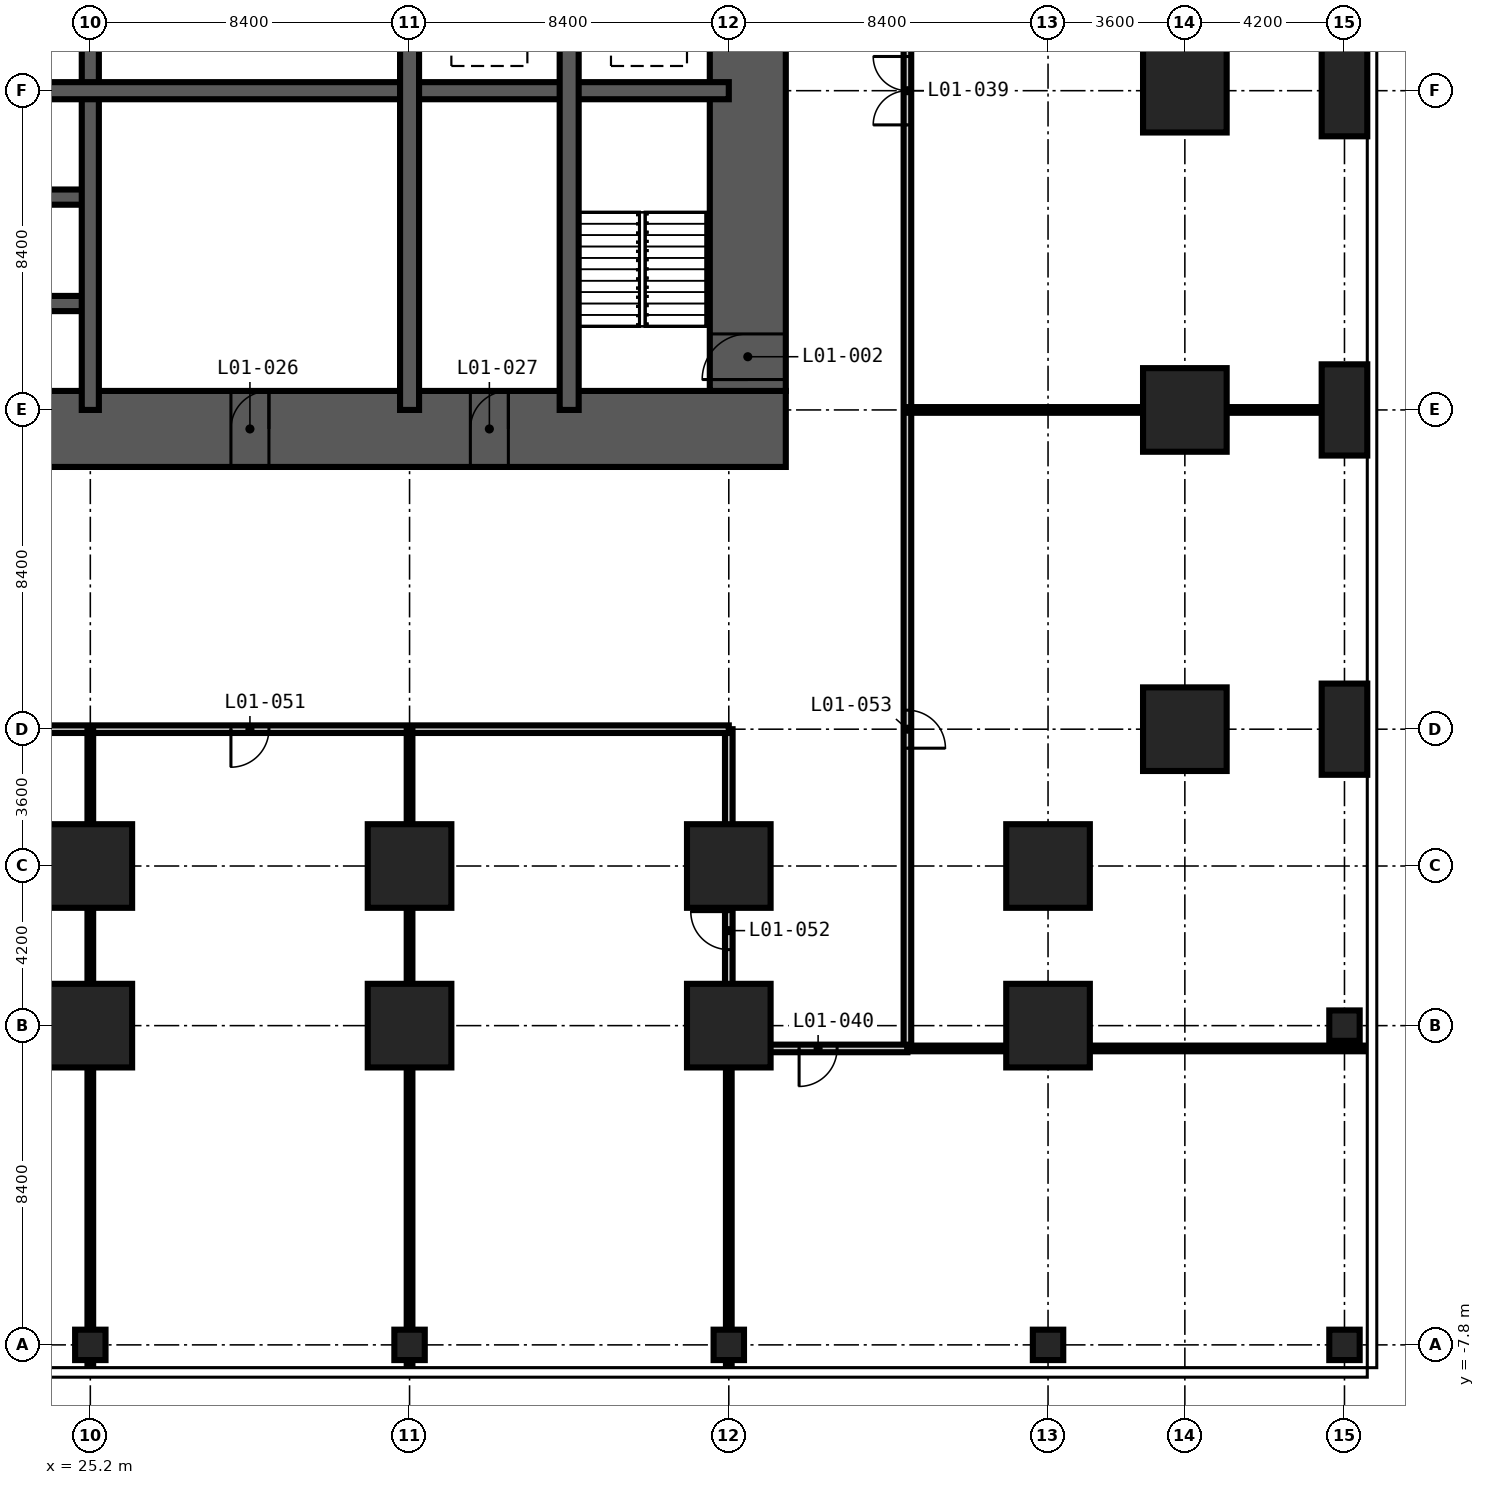
"""IFC4 building model, lengths in metres.
Left out: names, types, materials, properties, quantities, classifications, styles, units other than length and angle.
Written with IfcOpenShell. Run it as: python <this file> out.ifc"""

import sys

from ifc_helpers import new_model, si_unit, direction, frame, frame_2d, origin, origin_2d, place, context, subcontext, project, spatial, rectangle, extrude, element, fill, save


model = new_model("IFC4")
c1 = context("Model", 3, precision=1e-05, world=origin(), true_north=direction((0.0, 1.0)))
c2 = subcontext(c1, "Body", "Model", "MODEL_VIEW")
j1 = project(units=[si_unit("LENGTHUNIT", "METRE"), si_unit("PLANEANGLEUNIT", "RADIAN")], contexts=[c1])
p1 = place(None, origin())
s1 = spatial("IfcSite", under=j1, at=p1, CompositionType="ELEMENT")
p2 = place(p1, origin())
s2 = spatial("IfcBuilding", under=s1, at=p2, CompositionType="ELEMENT")
p3 = place(p2, frame((0.0, 0.0, 6.0)))
s3 = spatial("IfcBuildingStorey", under=s2, at=p3, CompositionType="ELEMENT", Elevation=6.0)
for number, where, z_axis, x_axis in (
    (1, (25.2, 0.6, -0.3), (0.0, 0.0, 1.0), (1.0, 0.0, 0.0)),
    (2, (25.2, 4.8, -0.3), (0.0, 0.0, 1.0), (1.0, 0.0, 0.0)),
    (3, (33.6, 0.6, -0.3), (0.0, 0.0, 1.0), (1.0, 0.0, 0.0)),
    (4, (33.6, 4.8, -0.3), (0.0, 0.0, 1.0), (1.0, 0.0, 0.0)),
    (5, (42.0, 0.6, -0.3), (0.0, 0.0, 1.0), (1.0, 0.0, 0.0)),
    (6, (42.0, 4.8, -0.3), (0.0, 0.0, 1.0), (1.0, 0.0, 0.0)),
    (7, (50.4, 0.6, -0.3), (0.0, 0.0, 1.0), (1.0, 0.0, 0.0)),
    (8, (50.4, 4.8, -0.3), (0.0, 0.0, 1.0), (1.0, 0.0, 0.0)),
    (9, (54.0, 8.4, -0.3), (0.0, 0.0, 1.0), (1.0, 0.0, 0.0)),
    (10, (54.0, 16.8, -0.3), (0.0, 0.0, 1.0), (1.0, 0.0, 0.0)),
    (11, (54.0, 25.2, -0.3), (0.0, 0.0, 1.0), (1.0, 0.0, 0.0)),
):
    element("IfcColumn", number, at=place(p3, frame(where, z_axis=z_axis, x_axis=x_axis)), inside=s3, PredefinedType="COLUMN", context=c2, shape_type="SweptSolid", body=[
        extrude(rectangle(XDim=2.2, YDim=2.2, at=origin_2d()), origin(), (0.0, 0.0, 1.0), 6.0),
    ])
for number, where, z_axis, x_axis in (
    (12, (58.2, 8.4, -0.3), (0.0, 0.0, 1.0), (1.0, 0.0, 0.0)),
    (13, (58.2, 16.8, -0.3), (0.0, 0.0, 1.0), (1.0, 0.0, 0.0)),
    (14, (58.2, 25.2, -0.3), (0.0, 0.0, 1.0), (1.0, 0.0, 0.0)),
):
    element("IfcColumn", number, at=place(p3, frame(where, z_axis=z_axis, x_axis=x_axis)), inside=s3, PredefinedType="COLUMN", context=c2, shape_type="SweptSolid", body=[
        extrude(rectangle(XDim=1.2, YDim=2.4, at=origin_2d()), origin(), (0.0, 0.0, 1.0), 6.0),
    ])
for number, where, z_axis, x_axis in (
    (15, (25.2, -7.8, -0.3), (0.0, 0.0, 1.0), (1.0, 0.0, 0.0)),
    (16, (33.6, -7.8, -0.3), (0.0, 0.0, 1.0), (1.0, 0.0, 0.0)),
    (17, (42.0, -7.8, -0.3), (0.0, 0.0, 1.0), (1.0, 0.0, 0.0)),
    (18, (50.4, -7.8, -0.3), (0.0, 0.0, 1.0), (1.0, 0.0, 0.0)),
    (19, (58.2, -7.8, -0.3), (0.0, 0.0, 1.0), (1.0, 0.0, 0.0)),
    (20, (58.2, 0.6, -0.3), (0.0, 0.0, 1.0), (1.0, 0.0, 0.0)),
):
    element("IfcColumn", number, at=place(p3, frame(where, z_axis=z_axis, x_axis=x_axis)), inside=s3, PredefinedType="COLUMN", context=c2, shape_type="SweptSolid", body=[
        extrude(rectangle(XDim=0.8, YDim=0.8, at=origin_2d()), origin(), (0.0, 0.0, 1.0), 6.0),
    ])
p4 = place(p3, frame((15.3, 16.3, -0.3), z_axis=(0.0, 0.0, 1.0), x_axis=(1.0, 0.0, 0.0)))
e21 = element("IfcWall", 21, at=p4, inside=s3, PredefinedType="SHEAR", context=c2, shape_type="SweptSolid", body=[
    extrude(rectangle(XDim=28.2, YDim=2.0, at=frame_2d((14.1, 0.0))), origin(), (0.0, 0.0, 1.0), 6.0),
])
p5 = place(p4, frame((13.6, 0.0, 0.3)))
e22 = element("IfcOpeningElement", 22, at=p5, cuts=e21, PredefinedType="OPENING", context=c2, shape_type="SweptSolid", body=[
    extrude(rectangle(XDim=1.0, YDim=2.1, at=frame_2d((0.5, 1.05))), frame((0.0, 1.01, 0.0), z_axis=(0.0, -1.0, 0.0), x_axis=(1.0, 0.0, 0.0)), (0.0, 0.0, 1.0), 2.02),
])
p6 = place(p4, frame((19.9, 0.0, 0.3)))
e23 = element("IfcOpeningElement", 23, at=p6, cuts=e21, PredefinedType="OPENING", context=c2, shape_type="SweptSolid", body=[
    extrude(rectangle(XDim=1.0, YDim=2.1, at=frame_2d((0.5, 1.05))), frame((0.0, 1.01, 0.0), z_axis=(0.0, -1.0, 0.0), x_axis=(1.0, 0.0, 0.0)), (0.0, 0.0, 1.0), 2.02),
])
p7 = place(p3, frame((42.5, 17.3, -0.3), z_axis=(0.0, 0.0, 1.0), x_axis=(0.0, 1.0, 0.0)))
e24 = element("IfcWall", 24, at=p7, inside=s3, PredefinedType="SHEAR", context=c2, shape_type="SweptSolid", body=[
    extrude(rectangle(XDim=24.2, YDim=2.0, at=frame_2d((12.1, 0.0))), origin(), (0.0, 0.0, 1.0), 6.0),
])
p8 = place(p7, frame((0.3, 0.0, 0.3)))
e25 = element("IfcOpeningElement", 25, at=p8, cuts=e24, PredefinedType="OPENING", context=c2, shape_type="SweptSolid", body=[
    extrude(rectangle(XDim=1.2, YDim=2.2, at=frame_2d((0.6, 1.1))), frame((0.0, 1.01, 0.0), z_axis=(0.0, -1.0, 0.0), x_axis=(1.0, 0.0, 0.0)), (0.0, 0.0, 1.0), 2.02),
])
p9 = place(p7, frame((11.6, 0.0, 0.3)))
e26 = element("IfcOpeningElement", 26, at=p9, cuts=e24, PredefinedType="OPENING", context=c2, shape_type="SweptSolid", body=[
    extrude(rectangle(XDim=1.0, YDim=2.1, at=frame_2d((0.5, 1.05))), frame((0.0, 1.01, 0.0), z_axis=(0.0, -1.0, 0.0), x_axis=(1.0, 0.0, 0.0)), (0.0, 0.0, 1.0), 2.02),
])
p10 = place(p7, frame((20.0, 0.0, 0.3)))
e27 = element("IfcOpeningElement", 27, at=p10, cuts=e24, PredefinedType="OPENING", context=c2, shape_type="SweptSolid", body=[
    extrude(rectangle(XDim=1.0, YDim=2.1, at=frame_2d((0.5, 1.05))), frame((0.0, 1.01, 0.0), z_axis=(0.0, -1.0, 0.0), x_axis=(1.0, 0.0, 0.0)), (0.0, 0.0, 1.0), 2.02),
])
for number, where, z_axis, x_axis in (
    (28, (16.8, 19.6, -0.3), (0.0, 0.0, 1.0), (1.0, 0.0, 0.0)),
    (29, (16.8, 22.4, -0.3), (0.0, 0.0, 1.0), (1.0, 0.0, 0.0)),
):
    element("IfcWall", number, at=place(p3, frame(where, z_axis=z_axis, x_axis=x_axis)), inside=s3, PredefinedType="SHEAR", context=c2, shape_type="SweptSolid", body=[
        extrude(rectangle(XDim=8.4, YDim=0.4, at=frame_2d((4.2, 0.0))), origin(), (0.0, 0.0, 1.0), 6.0),
    ])
for number, where, z_axis, x_axis in (
    (30, (25.2, 16.8, -0.3), (0.0, 0.0, 1.0), (0.0, 1.0, 0.0)),
    (31, (16.8, 25.2, -0.3), (0.0, 0.0, 1.0), (1.0, 0.0, 0.0)),
):
    element("IfcWall", number, at=place(p3, frame(where, z_axis=z_axis, x_axis=x_axis)), inside=s3, PredefinedType="SHEAR", context=c2, shape_type="SweptSolid", body=[
        extrude(rectangle(XDim=25.2, YDim=0.45, at=frame_2d((12.6, 0.0))), origin(), (0.0, 0.0, 1.0), 6.0),
    ])
p11 = place(p3, frame((33.6, 16.8, -0.3), z_axis=(0.0, 0.0, 1.0), x_axis=(0.0, 1.0, 0.0)))
e32 = element("IfcWall", 32, at=p11, inside=s3, PredefinedType="SHEAR", context=c2, shape_type="SweptSolid", body=[
    extrude(rectangle(XDim=25.2, YDim=0.5, at=frame_2d((12.6, 0.0))), origin(), (0.0, 0.0, 1.0), 6.0),
])
p12 = place(p11, frame((22.5, 0.0, 0.3)))
e33 = element("IfcOpeningElement", 33, at=p12, cuts=e32, PredefinedType="OPENING", context=c2, shape_type="SweptSolid", body=[
    extrude(rectangle(XDim=1.2, YDim=2.2, at=frame_2d((0.6, 1.1))), frame((0.0, 0.26, 0.0), z_axis=(0.0, -1.0, 0.0), x_axis=(1.0, 0.0, 0.0)), (0.0, 0.0, 1.0), 0.52),
])
p13 = place(p11, frame((18.3, 0.0, 0.3)))
e34 = element("IfcOpeningElement", 34, at=p13, cuts=e32, PredefinedType="OPENING", context=c2, shape_type="SweptSolid", body=[
    extrude(rectangle(XDim=1.2, YDim=2.2, at=frame_2d((0.6, 1.1))), frame((0.0, 0.26, 0.0), z_axis=(0.0, -1.0, 0.0), x_axis=(1.0, 0.0, 0.0)), (0.0, 0.0, 1.0), 0.52),
])
p14 = place(p11, frame((12.1, 0.0, 0.3)))
e35 = element("IfcOpeningElement", 35, at=p14, cuts=e32, PredefinedType="OPENING", context=c2, shape_type="SweptSolid", body=[
    extrude(rectangle(XDim=1.0, YDim=2.1, at=frame_2d((0.5, 1.05))), frame((0.0, 0.26, 0.0), z_axis=(0.0, -1.0, 0.0), x_axis=(1.0, 0.0, 0.0)), (0.0, 0.0, 1.0), 0.52),
])
p15 = place(p3, frame((37.8, 16.8, -0.3), z_axis=(0.0, 0.0, 1.0), x_axis=(0.0, 1.0, 0.0)))
e36 = element("IfcWall", 36, at=p15, inside=s3, PredefinedType="SHEAR", context=c2, shape_type="SweptSolid", body=[
    extrude(rectangle(XDim=11.2, YDim=0.5, at=frame_2d((5.6, 0.0))), origin(), (0.0, 0.0, 1.0), 6.0),
])
p16 = place(p3, frame((42.0, 0.0, 0.0), z_axis=(0.0, 0.0, 1.0), x_axis=(0.0, 1.0, 0.0)))
e37 = element("IfcWall", 37, at=p16, inside=s3, PredefinedType="PARTITIONING", context=c2, shape_type="SweptSolid", body=[
    extrude(rectangle(XDim=8.4, YDim=0.2, at=frame_2d((4.2, 0.0))), origin(), (0.0, 0.0, 1.0), 5.7),
])
p17 = place(p16, frame((2.6, 0.0, 0.0)))
e38 = element("IfcOpeningElement", 38, at=p17, cuts=e37, PredefinedType="OPENING", context=c2, shape_type="SweptSolid", body=[
    extrude(rectangle(XDim=1.0, YDim=2.1, at=frame_2d((0.5, 1.05))), frame((0.0, 0.11, 0.0), z_axis=(0.0, -1.0, 0.0), x_axis=(1.0, 0.0, 0.0)), (0.0, 0.0, 1.0), 0.22),
])
p18 = place(p3, frame((46.7, 0.0, 0.0), z_axis=(0.0, 0.0, 1.0), x_axis=(0.0, 1.0, 0.0)))
e39 = element("IfcWall", 39, at=p18, inside=s3, PredefinedType="PARTITIONING", context=c2, shape_type="SweptSolid", body=[
    extrude(rectangle(XDim=42.0, YDim=0.2, at=frame_2d((21.0, 0.0))), origin(), (0.0, 0.0, 1.0), 5.7),
])
p19 = place(p18, frame((24.3, 0.0, 0.0)))
e40 = element("IfcOpeningElement", 40, at=p19, cuts=e39, PredefinedType="OPENING", context=c2, shape_type="SweptSolid", body=[
    extrude(rectangle(XDim=1.8, YDim=2.4, at=frame_2d((0.9, 1.2))), frame((0.0, 0.11, 0.0), z_axis=(0.0, -1.0, 0.0), x_axis=(1.0, 0.0, 0.0)), (0.0, 0.0, 1.0), 0.22),
])
p20 = place(p18, frame((7.9, 0.0, 0.0)))
e41 = element("IfcOpeningElement", 41, at=p20, cuts=e39, PredefinedType="OPENING", context=c2, shape_type="SweptSolid", body=[
    extrude(rectangle(XDim=1.0, YDim=2.1, at=frame_2d((0.5, 1.05))), frame((0.0, 0.11, 0.0), z_axis=(0.0, -1.0, 0.0), x_axis=(1.0, 0.0, 0.0)), (0.0, 0.0, 1.0), 0.22),
])
p21 = place(p18, frame((37.3, 0.0, 0.0)))
e42 = element("IfcOpeningElement", 42, at=p21, cuts=e39, PredefinedType="OPENING", context=c2, shape_type="SweptSolid", body=[
    extrude(rectangle(XDim=1.0, YDim=2.1, at=frame_2d((0.5, 1.05))), frame((0.0, 0.11, 0.0), z_axis=(0.0, -1.0, 0.0), x_axis=(1.0, 0.0, 0.0)), (0.0, 0.0, 1.0), 0.22),
])
p22 = place(p3, frame((42.0, 0.0, 0.0), z_axis=(0.0, 0.0, 1.0), x_axis=(1.0, 0.0, 0.0)))
e43 = element("IfcWall", 43, at=p22, inside=s3, PredefinedType="PARTITIONING", context=c2, shape_type="SweptSolid", body=[
    extrude(rectangle(XDim=4.7, YDim=0.2, at=frame_2d((2.35, 0.0))), origin(), (0.0, 0.0, 1.0), 5.7),
])
p23 = place(p22, frame((1.85, 0.0, 0.0)))
e44 = element("IfcOpeningElement", 44, at=p23, cuts=e43, PredefinedType="OPENING", context=c2, shape_type="SweptSolid", body=[
    extrude(rectangle(XDim=1.0, YDim=2.1, at=frame_2d((0.5, 1.05))), frame((0.0, 0.11, 0.0), z_axis=(0.0, -1.0, 0.0), x_axis=(1.0, 0.0, 0.0)), (0.0, 0.0, 1.0), 0.22),
])
p24 = place(p3, frame((0.0, 8.4, 0.0), z_axis=(0.0, 0.0, 1.0), x_axis=(1.0, 0.0, 0.0)))
e45 = element("IfcWall", 45, at=p24, inside=s3, PredefinedType="PARTITIONING", context=c2, shape_type="SweptSolid", body=[
    extrude(rectangle(XDim=42.0, YDim=0.2, at=frame_2d((21.0, 0.0))), origin(), (0.0, 0.0, 1.0), 5.7),
])
p25 = place(p24, frame((6.0, 0.0, 0.0)))
e46 = element("IfcOpeningElement", 46, at=p25, cuts=e45, PredefinedType="OPENING", context=c2, shape_type="SweptSolid", body=[
    extrude(rectangle(XDim=1.0, YDim=2.1, at=frame_2d((0.5, 1.05))), frame((0.0, 0.11, 0.0), z_axis=(0.0, -1.0, 0.0), x_axis=(1.0, 0.0, 0.0)), (0.0, 0.0, 1.0), 0.22),
])
p26 = place(p24, frame((18.0, 0.0, 0.0)))
e47 = element("IfcOpeningElement", 47, at=p26, cuts=e45, PredefinedType="OPENING", context=c2, shape_type="SweptSolid", body=[
    extrude(rectangle(XDim=1.8, YDim=2.4, at=frame_2d((0.9, 1.2))), frame((0.0, 0.11, 0.0), z_axis=(0.0, -1.0, 0.0), x_axis=(1.0, 0.0, 0.0)), (0.0, 0.0, 1.0), 0.22),
])
p27 = place(p24, frame((28.9, 0.0, 0.0)))
e48 = element("IfcOpeningElement", 48, at=p27, cuts=e45, PredefinedType="OPENING", context=c2, shape_type="SweptSolid", body=[
    extrude(rectangle(XDim=1.0, YDim=2.1, at=frame_2d((0.5, 1.05))), frame((0.0, 0.11, 0.0), z_axis=(0.0, -1.0, 0.0), x_axis=(1.0, 0.0, 0.0)), (0.0, 0.0, 1.0), 0.22),
])
for number, where, z_axis, x_axis in (
    (49, (25.2, -8.4, 0.0), (0.0, 0.0, 1.0), (0.0, 1.0, 0.0)),
    (50, (33.6, -8.4, 0.0), (0.0, 0.0, 1.0), (0.0, 1.0, 0.0)),
):
    element("IfcWall", number, at=place(p3, frame(where, z_axis=z_axis, x_axis=x_axis)), inside=s3, PredefinedType="PARTITIONING", context=c2, shape_type="SweptSolid", body=[
        extrude(rectangle(XDim=16.8, YDim=0.15, at=frame_2d((8.4, 0.0))), origin(), (0.0, 0.0, 1.0), 5.7),
    ])
p28 = place(p3, frame((42.0, -8.4, 0.0), z_axis=(0.0, 0.0, 1.0), x_axis=(0.0, 1.0, 0.0)))
e51 = element("IfcWall", 51, at=p28, inside=s3, PredefinedType="PARTITIONING", context=c2, shape_type="SweptSolid", body=[
    extrude(rectangle(XDim=8.4, YDim=0.15, at=frame_2d((4.2, 0.0))), origin(), (0.0, 0.0, 1.0), 5.7),
])
for number, where, z_axis, x_axis in (
    (52, (46.7, 0.0, 0.0), (0.0, 0.0, 1.0), (1.0, 0.0, 0.0)),
    (53, (46.7, 16.8, 0.0), (0.0, 0.0, 1.0), (1.0, 0.0, 0.0)),
):
    element("IfcWall", number, at=place(p3, frame(where, z_axis=z_axis, x_axis=x_axis)), inside=s3, PredefinedType="PARTITIONING", context=c2, shape_type="SweptSolid", body=[
        extrude(rectangle(XDim=12.1, YDim=0.15, at=frame_2d((6.05, 0.0))), origin(), (0.0, 0.0, 1.0), 5.7),
    ])
p29 = place(p8, origin())
e54 = element("IfcDoor", 54, at=p29, inside=s3, OperationType="SINGLE_SWING_LEFT", PredefinedType="DOOR", context=c2, shape_type="SweptSolid", body=[
    extrude(rectangle(XDim=1.2, YDim=2.2, at=frame_2d((0.6, 1.1))), frame((0.0, 0.025, 0.0), z_axis=(0.0, -1.0, 0.0), x_axis=(1.0, 0.0, 0.0)), (0.0, 0.0, 1.0), 0.05),
])
fill(e25, e54)
p30 = place(p5, origin())
e55 = element("IfcDoor", 55, at=p30, inside=s3, OperationType="SINGLE_SWING_RIGHT", PredefinedType="DOOR", context=c2, shape_type="SweptSolid", body=[
    extrude(rectangle(XDim=1.0, YDim=2.1, at=frame_2d((0.5, 1.05))), frame((0.0, 0.025, 0.0), z_axis=(0.0, -1.0, 0.0), x_axis=(1.0, 0.0, 0.0)), (0.0, 0.0, 1.0), 0.05),
])
fill(e22, e55)
p31 = place(p6, origin())
e56 = element("IfcDoor", 56, at=p31, inside=s3, OperationType="SINGLE_SWING_RIGHT", PredefinedType="DOOR", context=c2, shape_type="SweptSolid", body=[
    extrude(rectangle(XDim=1.0, YDim=2.1, at=frame_2d((0.5, 1.05))), frame((0.0, 0.025, 0.0), z_axis=(0.0, -1.0, 0.0), x_axis=(1.0, 0.0, 0.0)), (0.0, 0.0, 1.0), 0.05),
])
fill(e23, e56)
p32 = place(p19, origin())
e57 = element("IfcDoor", 57, at=p32, inside=s3, OperationType="DOUBLE_DOOR_DOUBLE_SWING", PredefinedType="DOOR", context=c2, shape_type="SweptSolid", body=[
    extrude(rectangle(XDim=1.8, YDim=2.4, at=frame_2d((0.9, 1.2))), frame((0.0, 0.025, 0.0), z_axis=(0.0, -1.0, 0.0), x_axis=(1.0, 0.0, 0.0)), (0.0, 0.0, 1.0), 0.05),
])
fill(e40, e57)
p33 = place(p23, frame((1.0, 0.0, 0.0), z_axis=(0.0, 0.0, 1.0), x_axis=(-1.0, 0.0, 0.0)))
e58 = element("IfcDoor", 58, at=p33, inside=s3, OperationType="SINGLE_SWING_RIGHT", PredefinedType="DOOR", context=c2, shape_type="SweptSolid", body=[
    extrude(rectangle(XDim=1.0, YDim=2.1, at=frame_2d((0.5, 1.05))), frame((0.0, 0.025, 0.0), z_axis=(0.0, -1.0, 0.0), x_axis=(1.0, 0.0, 0.0)), (0.0, 0.0, 1.0), 0.05),
])
fill(e44, e58)
p34 = place(p27, frame((1.0, 0.0, 0.0), z_axis=(0.0, 0.0, 1.0), x_axis=(-1.0, 0.0, 0.0)))
e59 = element("IfcDoor", 59, at=p34, inside=s3, OperationType="SINGLE_SWING_RIGHT", PredefinedType="DOOR", context=c2, shape_type="SweptSolid", body=[
    extrude(rectangle(XDim=1.0, YDim=2.1, at=frame_2d((0.5, 1.05))), frame((0.0, 0.025, 0.0), z_axis=(0.0, -1.0, 0.0), x_axis=(1.0, 0.0, 0.0)), (0.0, 0.0, 1.0), 0.05),
])
fill(e48, e59)
p35 = place(p17, origin())
e60 = element("IfcDoor", 60, at=p35, inside=s3, OperationType="SINGLE_SWING_RIGHT", PredefinedType="DOOR", context=c2, shape_type="SweptSolid", body=[
    extrude(rectangle(XDim=1.0, YDim=2.1, at=frame_2d((0.5, 1.05))), frame((0.0, 0.025, 0.0), z_axis=(0.0, -1.0, 0.0), x_axis=(1.0, 0.0, 0.0)), (0.0, 0.0, 1.0), 0.05),
])
fill(e38, e60)
p36 = place(p20, frame((1.0, 0.0, 0.0), z_axis=(0.0, 0.0, 1.0), x_axis=(-1.0, 0.0, 0.0)))
e61 = element("IfcDoor", 61, at=p36, inside=s3, OperationType="SINGLE_SWING_RIGHT", PredefinedType="DOOR", context=c2, shape_type="SweptSolid", body=[
    extrude(rectangle(XDim=1.0, YDim=2.1, at=frame_2d((0.5, 1.05))), frame((0.0, 0.025, 0.0), z_axis=(0.0, -1.0, 0.0), x_axis=(1.0, 0.0, 0.0)), (0.0, 0.0, 1.0), 0.05),
])
fill(e41, e61)
save(model, sys.argv[1])
